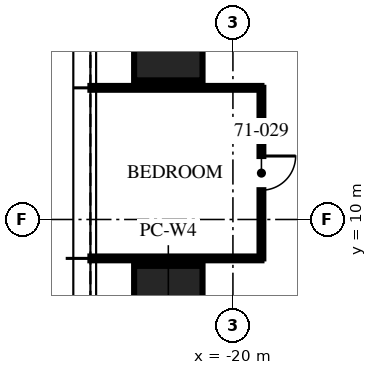
"""IFC4 building model, lengths in metres.
Left out: names, types, materials, properties, quantities, classifications, styles, units other than length and angle.
Written with IfcOpenShell. Run it as: python <this file> out.ifc"""

import sys

from ifc_helpers import new_model, si_unit, direction, frame, frame_2d, origin, origin_2d, place, context, subcontext, project, spatial, rectangle, extrude, element, fill, save


model = new_model("IFC4")
c1 = context("Model", 3, precision=1e-05, world=origin(), true_north=direction((0.0, 1.0)))
c2 = subcontext(c1, "Body", "Model", "MODEL_VIEW")
j1 = project(units=[si_unit("LENGTHUNIT", "METRE"), si_unit("PLANEANGLEUNIT", "RADIAN")], contexts=[c1])
p1 = place(None, origin())
s1 = spatial("IfcSite", under=j1, at=p1, CompositionType="ELEMENT")
p2 = place(p1, origin())
s2 = spatial("IfcBuilding", under=s1, at=p2, CompositionType="ELEMENT")
p3 = place(p2, frame((0.0, 0.0, 285.75)))
s3 = spatial("IfcBuildingStorey", under=s2, at=p3, CompositionType="ELEMENT", Elevation=285.75)
p4 = place(p3, frame((-21.7, 7.48, -0.09), z_axis=(0.0, 0.0, 1.0), x_axis=(0.0, 1.0, 0.0)))
e1 = element("IfcColumn", 1, at=p4, inside=s3, PredefinedType="COLUMN", context=c2, shape_type="SweptSolid", body=[
    extrude(rectangle(XDim=2.6, YDim=1.8, at=origin_2d()), origin(), (0.0, 0.0, 1.0), 3.84),
])
p5 = place(p3, frame((-21.7, 14.96, 0.04), z_axis=(0.0, 0.0, 1.0), x_axis=(0.0, 1.0, 0.0)))
e2 = element("IfcColumn", 2, at=p5, inside=s3, PredefinedType="COLUMN", context=c2, shape_type="SweptSolid", body=[
    extrude(rectangle(XDim=2.6, YDim=1.8, at=origin_2d()), origin(), (0.0, 0.0, 1.0), 3.71),
])
for number, where, z_axis, x_axis in (
    (3, (-19.25, 13.464, 0.0), (0.0, 0.0, 1.0), (-1.0, 0.0, 0.0)),
    (4, (-19.25, 8.976, 0.0), (0.0, 0.0, 1.0), (-1.0, 0.0, 0.0)),
):
    element("IfcWall", number, at=place(p3, frame(where, z_axis=z_axis, x_axis=x_axis)), inside=s3, PredefinedType="PARTITIONING", context=c2, shape_type="SweptSolid", body=[
        extrude(rectangle(XDim=4.5, YDim=0.1, at=frame_2d((2.25, 0.0))), origin(), (0.0, 0.0, 1.0), 3.01),
    ])
p6 = place(p3, frame((-19.25, 13.464, 0.0), z_axis=(0.0, 0.0, 1.0), x_axis=(0.0, -1.0, 0.0)))
e5 = element("IfcWall", 5, at=p6, inside=s3, PredefinedType="PARTITIONING", context=c2, shape_type="SweptSolid", body=[
    extrude(rectangle(XDim=4.488, YDim=0.1, at=frame_2d((2.244, 0.0))), origin(), (0.0, 0.0, 1.0), 2.91),
])
p7 = place(p6, frame((1.794, 0.0, 0.0)))
e6 = element("IfcOpeningElement", 6, at=p7, cuts=e5, PredefinedType="OPENING", context=c2, shape_type="SweptSolid", body=[
    extrude(rectangle(XDim=0.9, YDim=2.1, at=frame_2d((0.45, 1.05))), frame((0.0, 0.06, 0.0), z_axis=(0.0, -1.0, 0.0), x_axis=(1.0, 0.0, 0.0)), (0.0, 0.0, 1.0), 0.12),
])
p8 = place(p7, origin())
e7 = element("IfcDoor", 7, at=p8, inside=s3, OperationType="SINGLE_SWING_LEFT", PredefinedType="DOOR", context=c2, shape_type="SweptSolid", body=[
    extrude(rectangle(XDim=0.9, YDim=2.1, at=frame_2d((0.45, 1.05))), frame((0.0, 0.025, 0.0), z_axis=(0.0, -1.0, 0.0), x_axis=(1.0, 0.0, 0.0)), (0.0, 0.0, 1.0), 0.05),
])
fill(e6, e7)
save(model, sys.argv[1])
